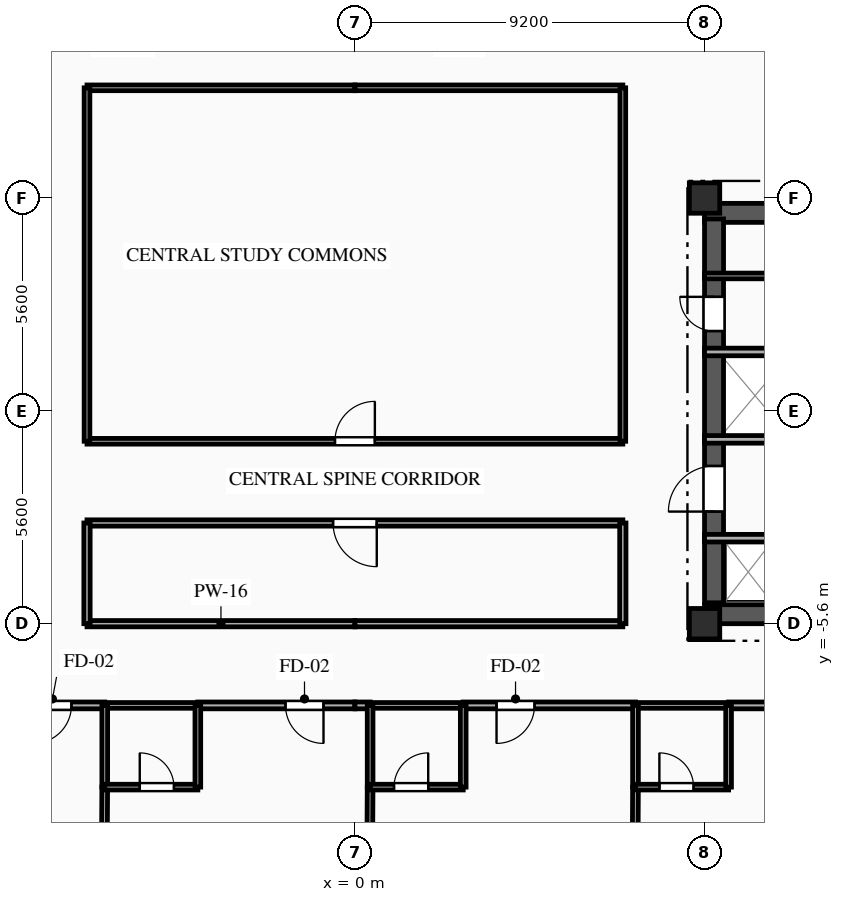
"""IFC4 building model, lengths in metres.
Left out: names, types, materials, properties, quantities, classifications, styles, units other than length and angle.
Written with IfcOpenShell. Run it as: python <this file> out.ifc"""

import sys

from ifc_helpers import new_model, si_unit, direction, frame, frame_2d, origin, origin_2d, place, context, subcontext, project, spatial, rectangle, extrude, element, fill, save


model = new_model("IFC4")
c1 = context("Model", 3, precision=1e-05, world=origin(), true_north=direction((0.0, 1.0)))
c2 = subcontext(c1, "Body", "Model", "MODEL_VIEW")
j1 = project(units=[si_unit("LENGTHUNIT", "METRE"), si_unit("PLANEANGLEUNIT", "RADIAN")], contexts=[c1])
p1 = place(None, origin())
s1 = spatial("IfcSite", under=j1, at=p1, CompositionType="ELEMENT")
p2 = place(p1, origin())
s2 = spatial("IfcBuilding", under=s1, at=p2, CompositionType="ELEMENT")
p3 = place(p2, frame((0.0, 0.0, 216.5)))
s3 = spatial("IfcBuildingStorey", under=s2, at=p3, CompositionType="ELEMENT", Elevation=216.5)
for number, where, z_axis, x_axis in (
    (1, (9.2, -5.6, 0.0), (0.0, 0.0, 1.0), (1.0, 0.0, 0.0)),
    (2, (9.2, 5.6, 0.0), (0.0, 0.0, 1.0), (1.0, 0.0, 0.0)),
):
    element("IfcColumn", number, at=place(p3, frame(where, z_axis=z_axis, x_axis=x_axis)), inside=s3, PredefinedType="COLUMN", context=c2, shape_type="SweptSolid", body=[
        extrude(rectangle(XDim=0.8, YDim=0.8, at=origin_2d()), origin(), (0.0, 0.0, 1.0), 3.35),
    ])
p4 = place(p3, frame((9.2, 5.21, 0.0), z_axis=(0.0, 0.0, 1.0), x_axis=(1.0, 0.0, 0.0)))
e3 = element("IfcWall", 3, at=p4, inside=s3, PredefinedType="SHEAR", context=c2, shape_type="SweptSolid", body=[
    extrude(rectangle(XDim=9.6, YDim=0.5, at=frame_2d((4.8, 0.0))), origin(), (0.0, 0.0, 1.0), 3.04),
])
p5 = place(p4, frame((6.95, 0.0, 0.0)))
e4 = element("IfcOpeningElement", 4, at=p5, cuts=e3, PredefinedType="OPENING", context=c2, shape_type="SweptSolid", body=[
    extrude(rectangle(XDim=1.1, YDim=2.15, at=frame_2d((0.55, 1.075))), frame((0.0, 0.26, 0.0), z_axis=(0.0, -1.0, 0.0), x_axis=(1.0, 0.0, 0.0)), (0.0, 0.0, 1.0), 0.52),
])
p6 = place(p4, frame((3.775, 0.0, 0.0)))
e5 = element("IfcOpeningElement", 5, at=p6, cuts=e3, PredefinedType="OPENING", context=c2, shape_type="SweptSolid", body=[
    extrude(rectangle(XDim=1.05, YDim=2.1, at=frame_2d((0.525, 1.05))), frame((0.0, 0.26, 0.0), z_axis=(0.0, -1.0, 0.0), x_axis=(1.0, 0.0, 0.0)), (0.0, 0.0, 1.0), 0.52),
])
p7 = place(p3, frame((9.2, -5.35, 0.0), z_axis=(0.0, 0.0, 1.0), x_axis=(1.0, 0.0, 0.0)))
e6 = element("IfcWall", 6, at=p7, inside=s3, PredefinedType="SHEAR", context=c2, shape_type="SweptSolid", body=[
    extrude(rectangle(XDim=9.6, YDim=0.5, at=frame_2d((4.8, 0.0))), origin(), (0.0, 0.0, 1.0), 3.04),
])
p8 = place(p7, frame((7.65, 0.0, 0.0)))
e7 = element("IfcOpeningElement", 7, at=p8, cuts=e6, PredefinedType="OPENING", context=c2, shape_type="SweptSolid", body=[
    extrude(rectangle(XDim=0.9, YDim=2.1, at=frame_2d((0.45, 1.05))), frame((0.0, 0.26, 0.0), z_axis=(0.0, -1.0, 0.0), x_axis=(1.0, 0.0, 0.0)), (0.0, 0.0, 1.0), 0.52),
])
p9 = place(p3, frame((9.45, -5.05, 0.0), z_axis=(0.0, 0.0, 1.0), x_axis=(0.0, 1.0, 0.0)))
e8 = element("IfcWall", 8, at=p9, inside=s3, PredefinedType="SHEAR", context=c2, shape_type="SweptSolid", body=[
    extrude(rectangle(XDim=10.1, YDim=0.5, at=frame_2d((5.05, 0.0))), origin(), (0.0, 0.0, 1.0), 3.04),
])
p10 = place(p9, frame((7.15, 0.0, 0.0)))
e9 = element("IfcOpeningElement", 9, at=p10, cuts=e8, PredefinedType="OPENING", context=c2, shape_type="SweptSolid", body=[
    extrude(rectangle(XDim=0.9, YDim=2.1, at=frame_2d((0.45, 1.05))), frame((0.0, 0.26, 0.0), z_axis=(0.0, -1.0, 0.0), x_axis=(1.0, 0.0, 0.0)), (0.0, 0.0, 1.0), 0.52),
])
p11 = place(p9, frame((2.4, 0.0, 0.0)))
e10 = element("IfcOpeningElement", 10, at=p11, cuts=e8, PredefinedType="OPENING", context=c2, shape_type="SweptSolid", body=[
    extrude(rectangle(XDim=1.2, YDim=2.15, at=frame_2d((0.6, 1.075))), frame((0.0, 0.26, 0.0), z_axis=(0.0, -1.0, 0.0), x_axis=(1.0, 0.0, 0.0)), (0.0, 0.0, 1.0), 0.52),
])
p12 = place(p3, frame((12.15, 3.55, 0.0), z_axis=(0.0, 0.0, 1.0), x_axis=(-1.0, 0.0, 0.0)))
e11 = element("IfcWall", 11, at=p12, inside=s3, PredefinedType="PARTITIONING", context=c2, shape_type="SweptSolid", body=[
    extrude(rectangle(XDim=2.95, YDim=0.15, at=frame_2d((1.475, 0.0))), origin(), (0.0, 0.0, 1.0), 3.04),
])
p13 = place(p12, frame((0.325, 0.0, 0.0)))
e12 = element("IfcOpeningElement", 12, at=p13, cuts=e11, PredefinedType="OPENING", context=c2, shape_type="SweptSolid", body=[
    extrude(rectangle(XDim=0.95, YDim=2.1, at=frame_2d((0.475, 1.05))), frame((0.0, 0.085, 0.0), z_axis=(0.0, -1.0, 0.0), x_axis=(1.0, 0.0, 0.0)), (0.0, 0.0, 1.0), 0.17),
])
p14 = place(p3, frame((9.2, -3.35, 0.0), z_axis=(0.0, 0.0, 1.0), x_axis=(1.0, 0.0, 0.0)))
e13 = element("IfcWall", 13, at=p14, inside=s3, PredefinedType="PARTITIONING", context=c2, shape_type="SweptSolid", body=[
    extrude(rectangle(XDim=1.88, YDim=0.2, at=frame_2d((0.94, 0.0))), origin(), (0.0, 0.0, 1.0), 2.755),
])
p15 = place(p3, frame((11.46, -0.75, 0.0), z_axis=(0.0, 0.0, 1.0), x_axis=(-1.0, 0.0, 0.0)))
e14 = element("IfcWall", 14, at=p15, inside=s3, PredefinedType="PARTITIONING", context=c2, shape_type="SweptSolid", body=[
    extrude(rectangle(XDim=2.26, YDim=0.2, at=frame_2d((1.13, 0.0))), origin(), (0.0, 0.0, 1.0), 3.04),
])
for number, where, z_axis, x_axis in (
    (15, (0.0, 8.5, 0.0), (0.0, 0.0, 1.0), (-1.0, 0.0, 0.0)),
    (16, (7.05, 8.5, 0.0), (0.0, 0.0, 1.0), (-1.0, 0.0, 0.0)),
):
    element("IfcWall", number, at=place(p3, frame(where, z_axis=z_axis, x_axis=x_axis)), inside=s3, PredefinedType="PARTITIONING", context=c2, shape_type="SweptSolid", body=[
        extrude(rectangle(XDim=7.05, YDim=0.15, at=frame_2d((3.525, 0.0))), origin(), (0.0, 0.0, 1.0), 3.04),
    ])
p16 = place(p3, frame((-6.583, -7.75, 0.0), z_axis=(0.0, 0.0, 1.0), x_axis=(-1.0, 0.0, 0.0)))
e17 = element("IfcWall", 17, at=p16, inside=s3, PredefinedType="PARTITIONING", context=c2, shape_type="SweptSolid", body=[
    extrude(rectangle(XDim=4.534, YDim=0.18, at=frame_2d((2.267, 0.0))), origin(), (0.0, 0.0, 1.0), 3.04),
])
p17 = place(p16, frame((0.877, 0.0, 0.0)))
e18 = element("IfcOpeningElement", 18, at=p17, cuts=e17, PredefinedType="OPENING", context=c2, shape_type="SweptSolid", body=[
    extrude(rectangle(XDim=1.0, YDim=2.15, at=frame_2d((0.5, 1.075))), frame((0.0, 0.1, 0.0), z_axis=(0.0, -1.0, 0.0), x_axis=(1.0, 0.0, 0.0)), (0.0, 0.0, 1.0), 0.2),
])
p18 = place(p3, frame((0.0, -7.75, 0.0), z_axis=(0.0, 0.0, 1.0), x_axis=(-1.0, 0.0, 0.0)))
e19 = element("IfcWall", 19, at=p18, inside=s3, PredefinedType="PARTITIONING", context=c2, shape_type="SweptSolid", body=[
    extrude(rectangle(XDim=4.133, YDim=0.18, at=frame_2d((2.066, 0.0))), origin(), (0.0, 0.0, 1.0), 3.04),
])
p19 = place(p18, frame((0.827, 0.0, 0.0)))
e20 = element("IfcOpeningElement", 20, at=p19, cuts=e19, PredefinedType="OPENING", context=c2, shape_type="SweptSolid", body=[
    extrude(rectangle(XDim=1.0, YDim=2.15, at=frame_2d((0.5, 1.075))), frame((0.0, 0.1, 0.0), z_axis=(0.0, -1.0, 0.0), x_axis=(1.0, 0.0, 0.0)), (0.0, 0.0, 1.0), 0.2),
])
p20 = place(p3, frame((-4.133, -7.75, 0.0), z_axis=(0.0, 0.0, 1.0), x_axis=(-1.0, 0.0, 0.0)))
e21 = element("IfcWall", 21, at=p20, inside=s3, PredefinedType="PLUMBINGWALL", context=c2, shape_type="SweptSolid", body=[
    extrude(rectangle(XDim=2.45, YDim=0.15, at=frame_2d((1.225, 0.0))), origin(), (0.0, 0.0, 1.0), 3.04),
])
p21 = place(p3, frame((-7.05, -5.6, 0.0), z_axis=(0.0, 0.0, 1.0), x_axis=(1.0, 0.0, 0.0)))
e22 = element("IfcWall", 22, at=p21, inside=s3, PredefinedType="PARTITIONING", context=c2, shape_type="SweptSolid", body=[
    extrude(rectangle(XDim=7.05, YDim=0.165, at=frame_2d((3.525, 0.0))), origin(), (0.0, 0.0, 1.0), 2.525),
])
p22 = place(p3, frame((0.4, -7.75, 0.0), z_axis=(0.0, 0.0, 1.0), x_axis=(-1.0, 0.0, 0.0)))
e23 = element("IfcWall", 23, at=p22, inside=s3, PredefinedType="PARTITIONING", context=c2, shape_type="SweptSolid", body=[
    extrude(rectangle(XDim=0.4, YDim=0.18, at=frame_2d((0.2, 0.0))), origin(), (0.0, 0.0, 1.0), 3.04),
])
p23 = place(p3, frame((7.383, -7.75, 0.0), z_axis=(0.0, 0.0, 1.0), x_axis=(-1.0, 0.0, 0.0)))
e24 = element("IfcWall", 24, at=p23, inside=s3, PredefinedType="PARTITIONING", context=c2, shape_type="SweptSolid", body=[
    extrude(rectangle(XDim=4.533, YDim=0.18, at=frame_2d((2.267, 0.0))), origin(), (0.0, 0.0, 1.0), 3.04),
])
p24 = place(p23, frame((2.656, 0.0, 0.0)))
e25 = element("IfcOpeningElement", 25, at=p24, cuts=e24, PredefinedType="OPENING", context=c2, shape_type="SweptSolid", body=[
    extrude(rectangle(XDim=1.0, YDim=2.15, at=frame_2d((0.5, 1.075))), frame((0.0, 0.1, 0.0), z_axis=(0.0, -1.0, 0.0), x_axis=(1.0, 0.0, 0.0)), (0.0, 0.0, 1.0), 0.2),
])
p25 = place(p3, frame((2.85, -7.75, 0.0), z_axis=(0.0, 0.0, 1.0), x_axis=(-1.0, 0.0, 0.0)))
e26 = element("IfcWall", 26, at=p25, inside=s3, PredefinedType="PLUMBINGWALL", context=c2, shape_type="SweptSolid", body=[
    extrude(rectangle(XDim=2.45, YDim=0.15, at=frame_2d((1.225, 0.0))), origin(), (0.0, 0.0, 1.0), 3.04),
])
p26 = place(p3, frame((14.367, -7.75, 0.0), z_axis=(0.0, 0.0, 1.0), x_axis=(-1.0, 0.0, 0.0)))
e27 = element("IfcWall", 27, at=p26, inside=s3, PredefinedType="PARTITIONING", context=c2, shape_type="SweptSolid", body=[
    extrude(rectangle(XDim=4.534, YDim=0.18, at=frame_2d((2.267, 0.0))), origin(), (0.0, 0.0, 1.0), 3.04),
])
p27 = place(p26, frame((0.877, 0.0, 0.0)))
e28 = element("IfcOpeningElement", 28, at=p27, cuts=e27, PredefinedType="OPENING", context=c2, shape_type="SweptSolid", body=[
    extrude(rectangle(XDim=1.0, YDim=2.15, at=frame_2d((0.5, 1.075))), frame((0.0, 0.1, 0.0), z_axis=(0.0, -1.0, 0.0), x_axis=(1.0, 0.0, 0.0)), (0.0, 0.0, 1.0), 0.2),
])
p28 = place(p3, frame((9.833, -7.75, 0.0), z_axis=(0.0, 0.0, 1.0), x_axis=(-1.0, 0.0, 0.0)))
e29 = element("IfcWall", 29, at=p28, inside=s3, PredefinedType="PLUMBINGWALL", context=c2, shape_type="SweptSolid", body=[
    extrude(rectangle(XDim=2.45, YDim=0.15, at=frame_2d((1.225, 0.0))), origin(), (0.0, 0.0, 1.0), 3.04),
])
p29 = place(p3, frame((0.0, -5.6, 0.0), z_axis=(0.0, 0.0, 1.0), x_axis=(1.0, 0.0, 0.0)))
e30 = element("IfcWall", 30, at=p29, inside=s3, PredefinedType="PARTITIONING", context=c2, shape_type="SweptSolid", body=[
    extrude(rectangle(XDim=7.05, YDim=0.165, at=frame_2d((3.525, 0.0))), origin(), (0.0, 0.0, 1.0), 2.525),
])
p30 = place(p3, frame((-7.05, -0.8, 0.0), z_axis=(0.0, 0.0, 1.0), x_axis=(1.0, 0.0, 0.0)))
e31 = element("IfcWall", 31, at=p30, inside=s3, PredefinedType="PARTITIONING", context=c2, shape_type="SweptSolid", body=[
    extrude(rectangle(XDim=14.1, YDim=0.15, at=frame_2d((7.05, 0.0))), origin(), (0.0, 0.0, 1.0), 3.04),
])
p31 = place(p30, frame((6.525, 0.0, 0.0)))
e32 = element("IfcOpeningElement", 32, at=p31, cuts=e31, PredefinedType="OPENING", context=c2, shape_type="SweptSolid", body=[
    extrude(rectangle(XDim=1.05, YDim=2.15, at=frame_2d((0.525, 1.075))), frame((0.0, 0.085, 0.0), z_axis=(0.0, -1.0, 0.0), x_axis=(1.0, 0.0, 0.0)), (0.0, 0.0, 1.0), 0.17),
])
p32 = place(p3, frame((7.05, -2.95, 0.0), z_axis=(0.0, 0.0, 1.0), x_axis=(-1.0, 0.0, 0.0)))
e33 = element("IfcWall", 33, at=p32, inside=s3, PredefinedType="PARTITIONING", context=c2, shape_type="SweptSolid", body=[
    extrude(rectangle(XDim=14.1, YDim=0.165, at=frame_2d((7.05, 0.0))), origin(), (0.0, 0.0, 1.0), 3.04),
])
p33 = place(p32, frame((6.475, 0.0, 0.0)))
e34 = element("IfcOpeningElement", 34, at=p33, cuts=e33, PredefinedType="OPENING", context=c2, shape_type="SweptSolid", body=[
    extrude(rectangle(XDim=1.15, YDim=2.15, at=frame_2d((0.575, 1.075))), frame((0.0, 0.093, 0.0), z_axis=(0.0, -1.0, 0.0), x_axis=(1.0, 0.0, 0.0)), (0.0, 0.0, 1.0), 0.185),
])
p34 = place(p3, frame((-7.05, 8.5, 0.0), z_axis=(0.0, 0.0, 1.0), x_axis=(0.0, -1.0, 0.0)))
e35 = element("IfcWall", 35, at=p34, inside=s3, PredefinedType="PARTITIONING", context=c2, shape_type="SweptSolid", body=[
    extrude(rectangle(XDim=9.3, YDim=0.15, at=frame_2d((4.65, 0.0))), origin(), (0.0, 0.0, 1.0), 3.04),
])
p35 = place(p3, frame((-7.05, -2.95, 0.0), z_axis=(0.0, 0.0, 1.0), x_axis=(0.0, -1.0, 0.0)))
e36 = element("IfcWall", 36, at=p35, inside=s3, PredefinedType="PARTITIONING", context=c2, shape_type="SweptSolid", body=[
    extrude(rectangle(XDim=2.65, YDim=0.165, at=frame_2d((1.325, 0.0))), origin(), (0.0, 0.0, 1.0), 3.04),
])
p36 = place(p3, frame((7.05, -0.8, 0.0), z_axis=(0.0, 0.0, 1.0), x_axis=(0.0, 1.0, 0.0)))
e37 = element("IfcWall", 37, at=p36, inside=s3, PredefinedType="PARTITIONING", context=c2, shape_type="SweptSolid", body=[
    extrude(rectangle(XDim=9.3, YDim=0.15, at=frame_2d((4.65, 0.0))), origin(), (0.0, 0.0, 1.0), 3.04),
])
p37 = place(p3, frame((7.05, -5.6, 0.0), z_axis=(0.0, 0.0, 1.0), x_axis=(0.0, 1.0, 0.0)))
e38 = element("IfcWall", 38, at=p37, inside=s3, PredefinedType="PARTITIONING", context=c2, shape_type="SweptSolid", body=[
    extrude(rectangle(XDim=2.65, YDim=0.165, at=frame_2d((1.325, 0.0))), origin(), (0.0, 0.0, 1.0), 3.04),
])
p38 = place(p3, frame((-6.583, -9.9, 0.0), z_axis=(0.0, 0.0, 1.0), x_axis=(-0.006340579882, -0.999979898321, 0.0)))
e39 = element("IfcWall", 39, at=p38, inside=s3, PredefinedType="PARTITIONING", context=c2, shape_type="SweptSolid", body=[
    extrude(rectangle(XDim=6.931, YDim=0.15, at=frame_2d((3.465, 0.0))), origin(), (0.0, 0.0, 1.0), 3.04),
])
p39 = place(p3, frame((-6.583, -7.75, 0.0), z_axis=(0.0, 0.0, 1.0), x_axis=(0.0, -1.0, 0.0)))
e40 = element("IfcWall", 40, at=p39, inside=s3, PredefinedType="PLUMBINGWALL", context=c2, shape_type="SweptSolid", body=[
    extrude(rectangle(XDim=2.15, YDim=0.15, at=frame_2d((1.075, 0.0))), origin(), (0.0, 0.0, 1.0), 3.04),
])
p40 = place(p3, frame((-6.583, -9.9, 0.0), z_axis=(0.0, 0.0, 1.0), x_axis=(1.0, 0.0, 0.0)))
e41 = element("IfcWall", 41, at=p40, inside=s3, PredefinedType="PLUMBINGWALL", context=c2, shape_type="SweptSolid", body=[
    extrude(rectangle(XDim=2.45, YDim=0.15, at=frame_2d((1.225, 0.0))), origin(), (0.0, 0.0, 1.0), 3.04),
])
p41 = place(p40, frame((0.921, 0.0, 0.0)))
e42 = element("IfcOpeningElement", 42, at=p41, cuts=e41, PredefinedType="OPENING", context=c2, shape_type="SweptSolid", body=[
    extrude(rectangle(XDim=0.9, YDim=2.1, at=frame_2d((0.45, 1.05))), frame((0.0, 0.085, 0.0), z_axis=(0.0, -1.0, 0.0), x_axis=(1.0, 0.0, 0.0)), (0.0, 0.0, 1.0), 0.17),
])
p42 = place(p3, frame((-4.133, -9.9, 0.0), z_axis=(0.0, 0.0, 1.0), x_axis=(0.0, 1.0, 0.0)))
e43 = element("IfcWall", 43, at=p42, inside=s3, PredefinedType="PLUMBINGWALL", context=c2, shape_type="SweptSolid", body=[
    extrude(rectangle(XDim=2.15, YDim=0.15, at=frame_2d((1.075, 0.0))), origin(), (0.0, 0.0, 1.0), 3.04),
])
p43 = place(p3, frame((0.4, -9.9, 0.0), z_axis=(0.0, 0.0, 1.0), x_axis=(-0.005701633766, -0.999983745554, 0.0)))
e44 = element("IfcWall", 44, at=p43, inside=s3, PredefinedType="PARTITIONING", context=c2, shape_type="SweptSolid", body=[
    extrude(rectangle(XDim=7.665, YDim=0.15, at=frame_2d((3.833, 0.0))), origin(), (0.0, 0.0, 1.0), 3.04),
])
p44 = place(p3, frame((0.4, -7.75, 0.0), z_axis=(0.0, 0.0, 1.0), x_axis=(0.0, -1.0, 0.0)))
e45 = element("IfcWall", 45, at=p44, inside=s3, PredefinedType="PLUMBINGWALL", context=c2, shape_type="SweptSolid", body=[
    extrude(rectangle(XDim=2.15, YDim=0.15, at=frame_2d((1.075, 0.0))), origin(), (0.0, 0.0, 1.0), 3.04),
])
p45 = place(p3, frame((0.4, -9.9, 0.0), z_axis=(0.0, 0.0, 1.0), x_axis=(1.0, 0.0, 0.0)))
e46 = element("IfcWall", 46, at=p45, inside=s3, PredefinedType="PLUMBINGWALL", context=c2, shape_type="SweptSolid", body=[
    extrude(rectangle(XDim=2.45, YDim=0.15, at=frame_2d((1.225, 0.0))), origin(), (0.0, 0.0, 1.0), 3.04),
])
p46 = place(p45, frame((0.629, 0.0, 0.0)))
e47 = element("IfcOpeningElement", 47, at=p46, cuts=e46, PredefinedType="OPENING", context=c2, shape_type="SweptSolid", body=[
    extrude(rectangle(XDim=0.9, YDim=2.1, at=frame_2d((0.45, 1.05))), frame((0.0, 0.085, 0.0), z_axis=(0.0, -1.0, 0.0), x_axis=(1.0, 0.0, 0.0)), (0.0, 0.0, 1.0), 0.17),
])
p47 = place(p3, frame((2.85, -9.9, 0.0), z_axis=(0.0, 0.0, 1.0), x_axis=(0.0, 1.0, 0.0)))
e48 = element("IfcWall", 48, at=p47, inside=s3, PredefinedType="PLUMBINGWALL", context=c2, shape_type="SweptSolid", body=[
    extrude(rectangle(XDim=2.15, YDim=0.15, at=frame_2d((1.075, 0.0))), origin(), (0.0, 0.0, 1.0), 3.04),
])
p48 = place(p3, frame((7.383, -9.9, 0.0), z_axis=(0.0, 0.0, 1.0), x_axis=(-0.00523233441, -0.999986311245, 0.0)))
e49 = element("IfcWall", 49, at=p48, inside=s3, PredefinedType="PARTITIONING", context=c2, shape_type="SweptSolid", body=[
    extrude(rectangle(XDim=8.399, YDim=0.15, at=frame_2d((4.199, 0.0))), origin(), (0.0, 0.0, 1.0), 3.04),
])
p49 = place(p3, frame((7.383, -7.75, 0.0), z_axis=(0.0, 0.0, 1.0), x_axis=(0.0, -1.0, 0.0)))
e50 = element("IfcWall", 50, at=p49, inside=s3, PredefinedType="PLUMBINGWALL", context=c2, shape_type="SweptSolid", body=[
    extrude(rectangle(XDim=2.15, YDim=0.15, at=frame_2d((1.075, 0.0))), origin(), (0.0, 0.0, 1.0), 3.04),
])
p50 = place(p3, frame((7.383, -9.9, 0.0), z_axis=(0.0, 0.0, 1.0), x_axis=(1.0, 0.0, 0.0)))
e51 = element("IfcWall", 51, at=p50, inside=s3, PredefinedType="PLUMBINGWALL", context=c2, shape_type="SweptSolid", body=[
    extrude(rectangle(XDim=2.45, YDim=0.15, at=frame_2d((1.225, 0.0))), origin(), (0.0, 0.0, 1.0), 3.04),
])
p51 = place(p50, frame((0.629, 0.0, 0.0)))
e52 = element("IfcOpeningElement", 52, at=p51, cuts=e51, PredefinedType="OPENING", context=c2, shape_type="SweptSolid", body=[
    extrude(rectangle(XDim=0.9, YDim=2.1, at=frame_2d((0.45, 1.05))), frame((0.0, 0.085, 0.0), z_axis=(0.0, -1.0, 0.0), x_axis=(1.0, 0.0, 0.0)), (0.0, 0.0, 1.0), 0.17),
])
p52 = place(p3, frame((9.833, -9.9, 0.0), z_axis=(0.0, 0.0, 1.0), x_axis=(0.0, 1.0, 0.0)))
e53 = element("IfcWall", 53, at=p52, inside=s3, PredefinedType="PLUMBINGWALL", context=c2, shape_type="SweptSolid", body=[
    extrude(rectangle(XDim=2.15, YDim=0.15, at=frame_2d((1.075, 0.0))), origin(), (0.0, 0.0, 1.0), 3.04),
])
p53 = place(p3, frame((9.2, 1.55, 0.0), z_axis=(0.0, 0.0, 1.0), x_axis=(1.0, 0.0, 0.0)))
e54 = element("IfcWall", 54, at=p53, inside=s3, PredefinedType="PARTITIONING", context=c2, shape_type="SweptSolid", body=[
    extrude(rectangle(XDim=5.82, YDim=0.2, at=frame_2d((2.91, 0.0))), origin(), (0.0, 0.0, 1.0), 3.04),
])
p54 = place(p10, origin())
e55 = element("IfcDoor", 55, at=p54, inside=s3, OperationType="SINGLE_SWING_RIGHT", PredefinedType="DOOR", context=c2, shape_type="SweptSolid", body=[
    extrude(rectangle(XDim=0.9, YDim=2.1, at=frame_2d((0.45, 1.05))), frame((0.0, 0.025, 0.0), z_axis=(0.0, -1.0, 0.0), x_axis=(1.0, 0.0, 0.0)), (0.0, 0.0, 1.0), 0.05),
])
fill(e9, e55)
p55 = place(p11, origin())
e56 = element("IfcDoor", 56, at=p55, inside=s3, OperationType="SINGLE_SWING_LEFT", PredefinedType="DOOR", context=c2, shape_type="SweptSolid", body=[
    extrude(rectangle(XDim=1.2, YDim=2.15, at=frame_2d((0.6, 1.075))), frame((0.0, 0.025, 0.0), z_axis=(0.0, -1.0, 0.0), x_axis=(1.0, 0.0, 0.0)), (0.0, 0.0, 1.0), 0.05),
])
fill(e10, e56)
p56 = place(p17, origin())
e57 = element("IfcDoor", 57, at=p56, inside=s3, OperationType="SINGLE_SWING_RIGHT", PredefinedType="DOOR", context=c2, shape_type="SweptSolid", body=[
    extrude(rectangle(XDim=1.0, YDim=2.15, at=frame_2d((0.5, 1.075))), frame((0.0, 0.025, 0.0), z_axis=(0.0, -1.0, 0.0), x_axis=(1.0, 0.0, 0.0)), (0.0, 0.0, 1.0), 0.05),
])
fill(e18, e57)
p57 = place(p19, origin())
e58 = element("IfcDoor", 58, at=p57, inside=s3, OperationType="SINGLE_SWING_LEFT", PredefinedType="DOOR", context=c2, shape_type="SweptSolid", body=[
    extrude(rectangle(XDim=1.0, YDim=2.15, at=frame_2d((0.5, 1.075))), frame((0.0, 0.025, 0.0), z_axis=(0.0, -1.0, 0.0), x_axis=(1.0, 0.0, 0.0)), (0.0, 0.0, 1.0), 0.05),
])
fill(e20, e58)
p58 = place(p24, origin())
e59 = element("IfcDoor", 59, at=p58, inside=s3, OperationType="SINGLE_SWING_RIGHT", PredefinedType="DOOR", context=c2, shape_type="SweptSolid", body=[
    extrude(rectangle(XDim=1.0, YDim=2.15, at=frame_2d((0.5, 1.075))), frame((0.0, 0.025, 0.0), z_axis=(0.0, -1.0, 0.0), x_axis=(1.0, 0.0, 0.0)), (0.0, 0.0, 1.0), 0.05),
])
fill(e25, e59)
p59 = place(p31, origin())
e60 = element("IfcDoor", 60, at=p59, inside=s3, OperationType="SINGLE_SWING_RIGHT", PredefinedType="DOOR", context=c2, shape_type="SweptSolid", body=[
    extrude(rectangle(XDim=1.05, YDim=2.15, at=frame_2d((0.525, 1.075))), frame((0.0, 0.025, 0.0), z_axis=(0.0, -1.0, 0.0), x_axis=(1.0, 0.0, 0.0)), (0.0, 0.0, 1.0), 0.05),
])
fill(e32, e60)
p60 = place(p33, origin())
e61 = element("IfcDoor", 61, at=p60, inside=s3, OperationType="SINGLE_SWING_LEFT", PredefinedType="DOOR", context=c2, shape_type="SweptSolid", body=[
    extrude(rectangle(XDim=1.15, YDim=2.15, at=frame_2d((0.575, 1.075))), frame((0.0, 0.025, 0.0), z_axis=(0.0, -1.0, 0.0), x_axis=(1.0, 0.0, 0.0)), (0.0, 0.0, 1.0), 0.05),
])
fill(e34, e61)
p61 = place(p41, origin())
e62 = element("IfcDoor", 62, at=p61, inside=s3, OperationType="SINGLE_SWING_LEFT", PredefinedType="DOOR", context=c2, shape_type="SweptSolid", body=[
    extrude(rectangle(XDim=0.9, YDim=2.1, at=frame_2d((0.45, 1.05))), frame((0.0, 0.025, 0.0), z_axis=(0.0, -1.0, 0.0), x_axis=(1.0, 0.0, 0.0)), (0.0, 0.0, 1.0), 0.05),
])
fill(e42, e62)
p62 = place(p46, origin())
e63 = element("IfcDoor", 63, at=p62, inside=s3, OperationType="SINGLE_SWING_RIGHT", PredefinedType="DOOR", context=c2, shape_type="SweptSolid", body=[
    extrude(rectangle(XDim=0.9, YDim=2.1, at=frame_2d((0.45, 1.05))), frame((0.0, 0.025, 0.0), z_axis=(0.0, -1.0, 0.0), x_axis=(1.0, 0.0, 0.0)), (0.0, 0.0, 1.0), 0.05),
])
fill(e47, e63)
p63 = place(p51, origin())
e64 = element("IfcDoor", 64, at=p63, inside=s3, OperationType="SINGLE_SWING_LEFT", PredefinedType="DOOR", context=c2, shape_type="SweptSolid", body=[
    extrude(rectangle(XDim=0.9, YDim=2.1, at=frame_2d((0.45, 1.05))), frame((0.0, 0.025, 0.0), z_axis=(0.0, -1.0, 0.0), x_axis=(1.0, 0.0, 0.0)), (0.0, 0.0, 1.0), 0.05),
])
fill(e52, e64)
save(model, sys.argv[1])
